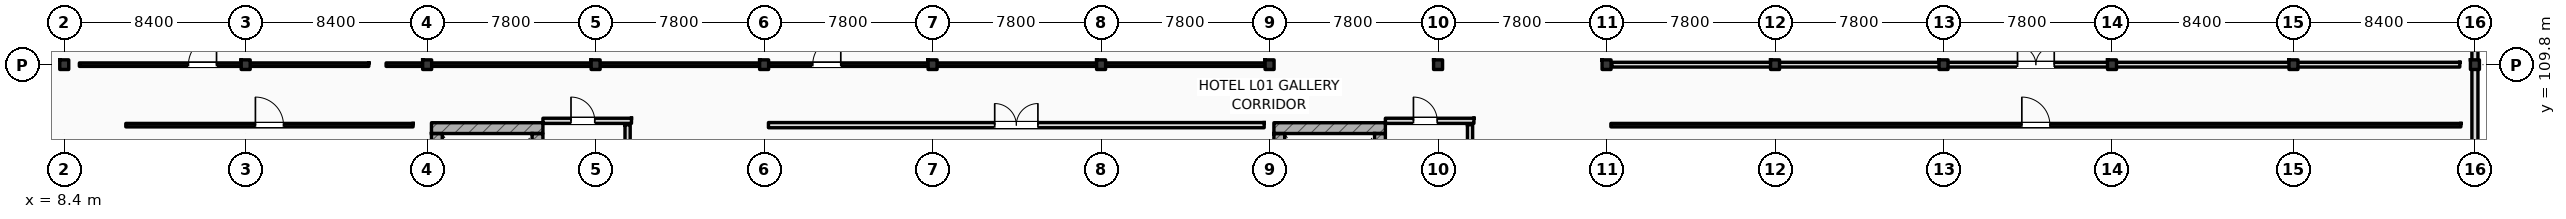
"""IFC4 building model, lengths in metres.
Left out: names, types, materials, properties, quantities, classifications, styles, units other than length and angle.
Written with IfcOpenShell. Run it as: python <this file> out.ifc"""

import sys

from ifc_helpers import new_model, si_unit, direction, frame, frame_2d, origin, origin_2d, place, context, subcontext, project, spatial, rectangle, i_section, extrude, element, fill, save


model = new_model("IFC4")
c1 = context("Model", 3, precision=1e-05, world=origin(), true_north=direction((0.0, 1.0)))
c2 = subcontext(c1, "Body", "Model", "MODEL_VIEW")
j1 = project(units=[si_unit("LENGTHUNIT", "METRE"), si_unit("PLANEANGLEUNIT", "RADIAN")], contexts=[c1])
p1 = place(None, origin())
s1 = spatial("IfcSite", under=j1, at=p1, CompositionType="ELEMENT")
p2 = place(p1, origin())
s2 = spatial("IfcBuilding", under=s1, at=p2, CompositionType="ELEMENT")
p3 = place(p2, frame((0.0, 0.0, 6.0)))
s3 = spatial("IfcBuildingStorey", under=s2, at=p3, CompositionType="ELEMENT", Elevation=6.0)
for number, where, z_axis, x_axis in (
    (1, (8.4, 109.8, 0.0), (0.0, 0.0, 1.0), (1.0, 0.0, 0.0)),
    (2, (16.8, 109.8, 0.0), (0.0, 0.0, 1.0), (1.0, 0.0, 0.0)),
    (3, (25.2, 109.8, 0.0), (0.0, 0.0, 1.0), (1.0, 0.0, 0.0)),
    (4, (33.0, 109.8, 0.0), (0.0, 0.0, 1.0), (1.0, 0.0, 0.0)),
    (5, (40.8, 109.8, 0.0), (0.0, 0.0, 1.0), (1.0, 0.0, 0.0)),
    (6, (48.6, 109.8, 0.0), (0.0, 0.0, 1.0), (1.0, 0.0, 0.0)),
    (7, (56.4, 109.8, 0.0), (0.0, 0.0, 1.0), (1.0, 0.0, 0.0)),
    (8, (64.2, 109.8, 0.0), (0.0, 0.0, 1.0), (1.0, 0.0, 0.0)),
    (9, (72.0, 109.8, 0.0), (0.0, 0.0, 1.0), (1.0, 0.0, 0.0)),
    (10, (79.8, 109.8, 0.0), (0.0, 0.0, 1.0), (1.0, 0.0, 0.0)),
    (11, (87.6, 109.8, 0.0), (0.0, 0.0, 1.0), (1.0, 0.0, 0.0)),
    (12, (95.4, 109.8, 0.0), (0.0, 0.0, 1.0), (1.0, 0.0, 0.0)),
    (13, (103.2, 109.8, 0.0), (0.0, 0.0, 1.0), (1.0, 0.0, 0.0)),
    (14, (111.6, 109.8, 0.0), (0.0, 0.0, 1.0), (1.0, 0.0, 0.0)),
    (15, (120.0, 109.8, 0.0), (0.0, 0.0, 1.0), (1.0, 0.0, 0.0)),
):
    element("IfcColumn", number, at=place(p3, frame(where, z_axis=z_axis, x_axis=x_axis)), inside=s3, PredefinedType="COLUMN", context=c2, shape_type="SweptSolid", body=[
        extrude(i_section(OverallWidth=0.416, OverallDepth=0.446, WebThickness=0.036, FlangeThickness=0.048, FilletRadius=0.015, at=origin_2d()), origin(), (0.0, 0.0, 1.0), 5.4),
    ])
p4 = place(p3, frame((25.4, 106.862, 0.0), z_axis=(0.0, 0.0, 1.0), x_axis=(1.0, 0.0, 0.0)))
e16 = element("IfcWall", 16, at=p4, inside=s3, PredefinedType="SHEAR", context=c2, shape_type="SweptSolid", body=[
    extrude(rectangle(XDim=5.16, YDim=0.5, at=frame_2d((2.58, 0.0))), origin(), (0.0, 0.0, 1.0), 5.4),
])
p5 = place(p3, frame((25.65, 97.5, 0.0), z_axis=(0.0, 0.0, 1.0), x_axis=(0.0, 1.0, 0.0)))
e17 = element("IfcWall", 17, at=p5, inside=s3, PredefinedType="SHEAR", context=c2, shape_type="SweptSolid", body=[
    extrude(rectangle(XDim=9.112, YDim=0.5, at=frame_2d((4.556, 0.0))), origin(), (0.0, 0.0, 1.0), 5.4),
])
p6 = place(p3, frame((30.31, 97.5, 0.0), z_axis=(0.0, 0.0, 1.0), x_axis=(0.0, 1.0, 0.0)))
e18 = element("IfcWall", 18, at=p6, inside=s3, PredefinedType="SHEAR", context=c2, shape_type="SweptSolid", body=[
    extrude(rectangle(XDim=9.112, YDim=0.5, at=frame_2d((4.556, 0.0))), origin(), (0.0, 0.0, 1.0), 5.4),
])
p7 = place(p6, frame((0.44, 0.0, 0.0)))
e19 = element("IfcOpeningElement", 19, at=p7, cuts=e18, PredefinedType="OPENING", context=c2, shape_type="SweptSolid", body=[
    extrude(rectangle(XDim=1.1, YDim=2.2, at=frame_2d((0.55, 1.1))), frame((0.0, 0.26, 0.0), z_axis=(0.0, -1.0, 0.0), x_axis=(1.0, 0.0, 0.0)), (0.0, 0.0, 1.0), 0.52),
])
p8 = place(p3, frame((64.4, 106.862, 0.0), z_axis=(0.0, 0.0, 1.0), x_axis=(1.0, 0.0, 0.0)))
e20 = element("IfcWall", 20, at=p8, inside=s3, PredefinedType="SHEAR", context=c2, shape_type="SweptSolid", body=[
    extrude(rectangle(XDim=5.16, YDim=0.5, at=frame_2d((2.58, 0.0))), origin(), (0.0, 0.0, 1.0), 5.4),
])
p9 = place(p3, frame((64.65, 97.5, 0.0), z_axis=(0.0, 0.0, 1.0), x_axis=(0.0, 1.0, 0.0)))
e21 = element("IfcWall", 21, at=p9, inside=s3, PredefinedType="SHEAR", context=c2, shape_type="SweptSolid", body=[
    extrude(rectangle(XDim=9.112, YDim=0.5, at=frame_2d((4.556, 0.0))), origin(), (0.0, 0.0, 1.0), 5.4),
])
p10 = place(p3, frame((69.31, 97.5, 0.0), z_axis=(0.0, 0.0, 1.0), x_axis=(0.0, 1.0, 0.0)))
e22 = element("IfcWall", 22, at=p10, inside=s3, PredefinedType="SHEAR", context=c2, shape_type="SweptSolid", body=[
    extrude(rectangle(XDim=9.112, YDim=0.5, at=frame_2d((4.556, 0.0))), origin(), (0.0, 0.0, 1.0), 5.4),
])
p11 = place(p10, frame((0.44, 0.0, 0.0)))
e23 = element("IfcOpeningElement", 23, at=p11, cuts=e22, PredefinedType="OPENING", context=c2, shape_type="SweptSolid", body=[
    extrude(rectangle(XDim=1.1, YDim=2.2, at=frame_2d((0.55, 1.1))), frame((0.0, 0.26, 0.0), z_axis=(0.0, -1.0, 0.0), x_axis=(1.0, 0.0, 0.0)), (0.0, 0.0, 1.0), 0.52),
])
p12 = place(p3, frame((120.0, 96.0, 0.0), z_axis=(0.0, 0.0, 1.0), x_axis=(0.0, 1.0, 0.0)))
e24 = element("IfcWall", 24, at=p12, inside=s3, PredefinedType="STANDARD", context=c2, shape_type="SweptSolid", body=[
    extrude(rectangle(XDim=22.0, YDim=0.28, at=frame_2d((11.0, 0.0))), origin(), (0.0, 0.0, 1.0), 4.59),
])
p13 = place(p3, frame((34.48, 98.78, 0.0), z_axis=(0.0, 0.0, 1.0), x_axis=(0.0, 1.0, 0.0)))
e25 = element("IfcWall", 25, at=p13, inside=s3, PredefinedType="STANDARD", context=c2, shape_type="SweptSolid", body=[
    extrude(rectangle(XDim=8.24, YDim=0.24, at=frame_2d((4.12, 0.0))), origin(), (0.0, 0.0, 1.0), 5.05),
])
p14 = place(p3, frame((30.56, 107.2, 0.0), z_axis=(0.0, 0.0, 1.0), x_axis=(1.0, 0.0, 0.0)))
e26 = element("IfcWall", 26, at=p14, inside=s3, PredefinedType="STANDARD", context=c2, shape_type="SweptSolid", body=[
    extrude(rectangle(XDim=4.1, YDim=0.24, at=frame_2d((2.05, 0.0))), origin(), (0.0, 0.0, 1.0), 5.05),
])
p15 = place(p14, frame((1.3, 0.0, 0.0)))
e27 = element("IfcOpeningElement", 27, at=p15, cuts=e26, PredefinedType="OPENING", context=c2, shape_type="SweptSolid", body=[
    extrude(rectangle(XDim=1.1, YDim=2.2, at=frame_2d((0.55, 1.1))), frame((0.0, 0.13, 0.0), z_axis=(0.0, -1.0, 0.0), x_axis=(1.0, 0.0, 0.0)), (0.0, 0.0, 1.0), 0.26),
])
p16 = place(p3, frame((73.48, 98.78, 0.0), z_axis=(0.0, 0.0, 1.0), x_axis=(0.0, 1.0, 0.0)))
e28 = element("IfcWall", 28, at=p16, inside=s3, PredefinedType="STANDARD", context=c2, shape_type="SweptSolid", body=[
    extrude(rectangle(XDim=8.24, YDim=0.24, at=frame_2d((4.12, 0.0))), origin(), (0.0, 0.0, 1.0), 5.05),
])
p17 = place(p3, frame((69.56, 107.2, 0.0), z_axis=(0.0, 0.0, 1.0), x_axis=(1.0, 0.0, 0.0)))
e29 = element("IfcWall", 29, at=p17, inside=s3, PredefinedType="STANDARD", context=c2, shape_type="SweptSolid", body=[
    extrude(rectangle(XDim=4.1, YDim=0.24, at=frame_2d((2.05, 0.0))), origin(), (0.0, 0.0, 1.0), 5.05),
])
p18 = place(p17, frame((1.3, 0.0, 0.0)))
e30 = element("IfcOpeningElement", 30, at=p18, cuts=e29, PredefinedType="OPENING", context=c2, shape_type="SweptSolid", body=[
    extrude(rectangle(XDim=1.1, YDim=2.2, at=frame_2d((0.55, 1.1))), frame((0.0, 0.13, 0.0), z_axis=(0.0, -1.0, 0.0), x_axis=(1.0, 0.0, 0.0)), (0.0, 0.0, 1.0), 0.26),
])
p19 = place(p3, frame((80.05, 109.8, 0.0), z_axis=(0.0, 0.0, 1.0), x_axis=(1.0, 0.0, 0.0)))
e31 = element("IfcWall", 31, at=p19, inside=s3, PredefinedType="PARTITIONING", context=c2, shape_type="SweptSolid", body=[
    extrude(rectangle(XDim=39.25, YDim=0.22, at=frame_2d((19.625, 0.0))), origin(), (0.0, 0.0, 1.0), 4.49),
])
p20 = place(p19, frame((18.775, 0.0, 0.0)))
e32 = element("IfcOpeningElement", 32, at=p20, cuts=e31, PredefinedType="OPENING", context=c2, shape_type="SweptSolid", body=[
    extrude(rectangle(XDim=1.7, YDim=2.3, at=frame_2d((0.85, 1.15))), frame((0.0, 0.12, 0.0), z_axis=(0.0, -1.0, 0.0), x_axis=(1.0, 0.0, 0.0)), (0.0, 0.0, 1.0), 0.24),
])
p21 = place(p3, frame((80.0, 107.0, 0.0), z_axis=(0.0, 0.0, 1.0), x_axis=(1.0, 0.0, 0.0)))
e33 = element("IfcWall", 33, at=p21, inside=s3, PredefinedType="PARTITIONING", context=c2, shape_type="SweptSolid", body=[
    extrude(rectangle(XDim=39.35, YDim=0.16, at=frame_2d((19.675, 0.0))), origin(), (0.0, 0.0, 1.0), 5.05),
])
p22 = place(p21, frame((19.025, 0.0, 0.0)))
e34 = element("IfcOpeningElement", 34, at=p22, cuts=e33, PredefinedType="OPENING", context=c2, shape_type="SweptSolid", body=[
    extrude(rectangle(XDim=1.3, YDim=2.2, at=frame_2d((0.65, 1.1))), frame((0.0, 0.09, 0.0), z_axis=(0.0, -1.0, 0.0), x_axis=(1.0, 0.0, 0.0)), (0.0, 0.0, 1.0), 0.18),
])
p23 = place(p3, frame((23.3, 109.8, 0.0), z_axis=(0.0, 0.0, 1.0), x_axis=(1.0, 0.0, 0.0)))
e35 = element("IfcWall", 35, at=p23, inside=s3, PredefinedType="PARTITIONING", context=c2, shape_type="SweptSolid", body=[
    extrude(rectangle(XDim=40.8, YDim=0.16, at=frame_2d((20.4, 0.0))), origin(), (0.0, 0.0, 1.0), 2.84),
])
p24 = place(p23, frame((19.75, 0.0, 0.0)))
e36 = element("IfcOpeningElement", 36, at=p24, cuts=e35, PredefinedType="OPENING", context=c2, shape_type="SweptSolid", body=[
    extrude(rectangle(XDim=1.3, YDim=2.2, at=frame_2d((0.65, 1.1))), frame((0.0, 0.09, 0.0), z_axis=(0.0, -1.0, 0.0), x_axis=(1.0, 0.0, 0.0)), (0.0, 0.0, 1.0), 0.18),
])
p25 = place(p3, frame((41.0, 107.0, 0.0), z_axis=(0.0, 0.0, 1.0), x_axis=(1.0, 0.0, 0.0)))
e37 = element("IfcWall", 37, at=p25, inside=s3, PredefinedType="STANDARD", context=c2, shape_type="SweptSolid", body=[
    extrude(rectangle(XDim=22.95, YDim=0.24, at=frame_2d((11.475, 0.0))), origin(), (0.0, 0.0, 1.0), 5.05),
])
p26 = place(p25, frame((10.475, 0.0, 0.0)))
e38 = element("IfcOpeningElement", 38, at=p26, cuts=e37, PredefinedType="OPENING", context=c2, shape_type="SweptSolid", body=[
    extrude(rectangle(XDim=2.0, YDim=2.35, at=frame_2d((1.0, 1.175))), frame((0.0, 0.13, 0.0), z_axis=(0.0, -1.0, 0.0), x_axis=(1.0, 0.0, 0.0)), (0.0, 0.0, 1.0), 0.26),
])
p27 = place(p3, frame((11.25, 107.0, 0.0), z_axis=(0.0, 0.0, 1.0), x_axis=(1.0, 0.0, 0.0)))
e39 = element("IfcWall", 39, at=p27, inside=s3, PredefinedType="PARTITIONING", context=c2, shape_type="SweptSolid", body=[
    extrude(rectangle(XDim=13.3, YDim=0.16, at=frame_2d((6.65, 0.0))), origin(), (0.0, 0.0, 1.0), 5.05),
])
p28 = place(p27, frame((6.0, 0.0, 0.0)))
e40 = element("IfcOpeningElement", 40, at=p28, cuts=e39, PredefinedType="OPENING", context=c2, shape_type="SweptSolid", body=[
    extrude(rectangle(XDim=1.3, YDim=2.2, at=frame_2d((0.65, 1.1))), frame((0.0, 0.09, 0.0), z_axis=(0.0, -1.0, 0.0), x_axis=(1.0, 0.0, 0.0)), (0.0, 0.0, 1.0), 0.18),
])
p29 = place(p3, frame((9.1, 109.8, 0.0), z_axis=(0.0, 0.0, 1.0), x_axis=(1.0, 0.0, 0.0)))
e41 = element("IfcWall", 41, at=p29, inside=s3, PredefinedType="PARTITIONING", context=c2, shape_type="SweptSolid", body=[
    extrude(rectangle(XDim=13.4, YDim=0.16, at=frame_2d((6.7, 0.0))), origin(), (0.0, 0.0, 1.0), 2.84),
])
p30 = place(p29, frame((5.05, 0.0, 0.0)))
e42 = element("IfcOpeningElement", 42, at=p30, cuts=e41, PredefinedType="OPENING", context=c2, shape_type="SweptSolid", body=[
    extrude(rectangle(XDim=1.3, YDim=2.2, at=frame_2d((0.65, 1.1))), frame((0.0, 0.09, 0.0), z_axis=(0.0, -1.0, 0.0), x_axis=(1.0, 0.0, 0.0)), (0.0, 0.0, 1.0), 0.18),
])
p31 = place(p15, origin())
e43 = element("IfcDoor", 43, at=p31, inside=s3, OperationType="SINGLE_SWING_LEFT", PredefinedType="DOOR", context=c2, shape_type="SweptSolid", body=[
    extrude(rectangle(XDim=1.1, YDim=2.2, at=frame_2d((0.55, 1.1))), frame((0.0, 0.025, 0.0), z_axis=(0.0, -1.0, 0.0), x_axis=(1.0, 0.0, 0.0)), (0.0, 0.0, 1.0), 0.05),
])
fill(e27, e43)
p32 = place(p18, origin())
e44 = element("IfcDoor", 44, at=p32, inside=s3, OperationType="SINGLE_SWING_LEFT", PredefinedType="DOOR", context=c2, shape_type="SweptSolid", body=[
    extrude(rectangle(XDim=1.1, YDim=2.2, at=frame_2d((0.55, 1.1))), frame((0.0, 0.025, 0.0), z_axis=(0.0, -1.0, 0.0), x_axis=(1.0, 0.0, 0.0)), (0.0, 0.0, 1.0), 0.05),
])
fill(e30, e44)
p33 = place(p20, origin())
e45 = element("IfcDoor", 45, at=p33, inside=s3, OperationType="DOUBLE_SWING_LEFT", PredefinedType="DOOR", context=c2, shape_type="SweptSolid", body=[
    extrude(rectangle(XDim=1.7, YDim=2.3, at=frame_2d((0.85, 1.15))), frame((0.0, 0.025, 0.0), z_axis=(0.0, -1.0, 0.0), x_axis=(1.0, 0.0, 0.0)), (0.0, 0.0, 1.0), 0.05),
])
fill(e32, e45)
p34 = place(p22, origin())
e46 = element("IfcDoor", 46, at=p34, inside=s3, OperationType="SINGLE_SWING_LEFT", PredefinedType="DOOR", context=c2, shape_type="SweptSolid", body=[
    extrude(rectangle(XDim=1.3, YDim=2.2, at=frame_2d((0.65, 1.1))), frame((0.0, 0.025, 0.0), z_axis=(0.0, -1.0, 0.0), x_axis=(1.0, 0.0, 0.0)), (0.0, 0.0, 1.0), 0.05),
])
fill(e34, e46)
p35 = place(p24, origin())
e47 = element("IfcDoor", 47, at=p35, inside=s3, OperationType="SINGLE_SWING_RIGHT", PredefinedType="DOOR", context=c2, shape_type="SweptSolid", body=[
    extrude(rectangle(XDim=1.3, YDim=2.2, at=frame_2d((0.65, 1.1))), frame((0.0, 0.025, 0.0), z_axis=(0.0, -1.0, 0.0), x_axis=(1.0, 0.0, 0.0)), (0.0, 0.0, 1.0), 0.05),
])
fill(e36, e47)
p36 = place(p26, origin())
e48 = element("IfcDoor", 48, at=p36, inside=s3, OperationType="DOUBLE_SWING_LEFT", PredefinedType="DOOR", context=c2, shape_type="SweptSolid", body=[
    extrude(rectangle(XDim=2.0, YDim=2.35, at=frame_2d((1.0, 1.175))), frame((0.0, 0.025, 0.0), z_axis=(0.0, -1.0, 0.0), x_axis=(1.0, 0.0, 0.0)), (0.0, 0.0, 1.0), 0.05),
])
fill(e38, e48)
p37 = place(p28, origin())
e49 = element("IfcDoor", 49, at=p37, inside=s3, OperationType="SINGLE_SWING_LEFT", PredefinedType="DOOR", context=c2, shape_type="SweptSolid", body=[
    extrude(rectangle(XDim=1.3, YDim=2.2, at=frame_2d((0.65, 1.1))), frame((0.0, 0.025, 0.0), z_axis=(0.0, -1.0, 0.0), x_axis=(1.0, 0.0, 0.0)), (0.0, 0.0, 1.0), 0.05),
])
fill(e40, e49)
p38 = place(p30, origin())
e50 = element("IfcDoor", 50, at=p38, inside=s3, OperationType="SINGLE_SWING_RIGHT", PredefinedType="DOOR", context=c2, shape_type="SweptSolid", body=[
    extrude(rectangle(XDim=1.3, YDim=2.2, at=frame_2d((0.65, 1.1))), frame((0.0, 0.025, 0.0), z_axis=(0.0, -1.0, 0.0), x_axis=(1.0, 0.0, 0.0)), (0.0, 0.0, 1.0), 0.05),
])
fill(e42, e50)
save(model, sys.argv[1])
